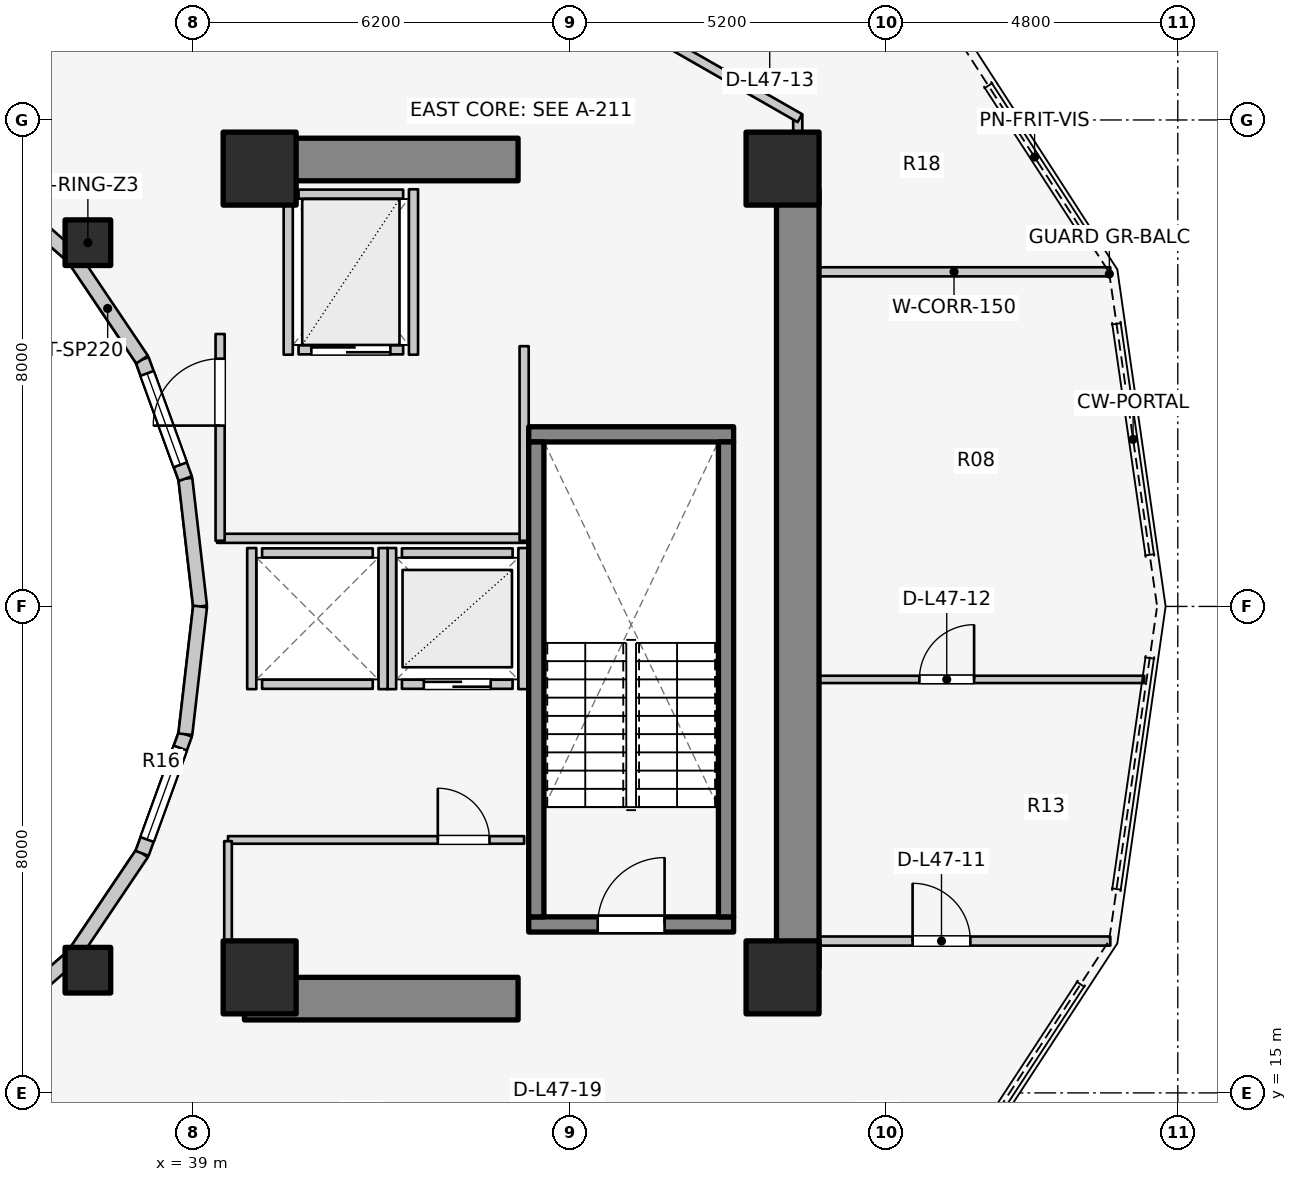
"""IFC4 building model, lengths in metres.
Left out: names, types, materials, properties, quantities, classifications, styles, units other than length and angle.
Written with IfcOpenShell. Run it as: python <this file> out.ifc"""

import sys

from ifc_helpers import new_model, si_unit, direction, frame, frame_2d, origin, origin_2d, place, context, subcontext, project, spatial, rectangle, extrude, element, fill, save


model = new_model("IFC4")
c1 = context("Model", 3, precision=1e-05, world=origin(), true_north=direction((0.0, 1.0)))
c2 = subcontext(c1, "Body", "Model", "MODEL_VIEW")
j1 = project(units=[si_unit("LENGTHUNIT", "METRE"), si_unit("PLANEANGLEUNIT", "RADIAN")], contexts=[c1])
p1 = place(None, origin())
s1 = spatial("IfcSite", under=j1, at=p1, CompositionType="ELEMENT")
p2 = place(p1, origin())
s2 = spatial("IfcBuilding", under=s1, at=p2, CompositionType="ELEMENT")
p3 = place(p2, frame((0.0, 0.0, 156.0)))
s3 = spatial("IfcBuildingStorey", under=s2, at=p3, CompositionType="ELEMENT", Elevation=156.0)
p4 = place(p3, frame((48.95, 17.05, 0.0), z_axis=(0.0, 0.0, 1.0), x_axis=(0.0, 1.0, 0.0)))
e1 = element("IfcWall", 1, at=p4, inside=s3, PredefinedType="SHEAR", context=c2, shape_type="SweptSolid", body=[
    extrude(rectangle(XDim=12.8, YDim=0.7, at=frame_2d((6.4, 0.0))), origin(), (0.0, 0.0, 1.0), 3.1),
])
for number, where, z_axis, x_axis in (
    (2, (39.85, 16.55, 0.0), (0.0, 0.0, 1.0), (1.0, 0.0, 0.0)),
    (3, (39.85, 30.35, 0.0), (0.0, 0.0, 1.0), (1.0, 0.0, 0.0)),
):
    element("IfcWall", number, at=place(p3, frame(where, z_axis=z_axis, x_axis=x_axis)), inside=s3, PredefinedType="SHEAR", context=c2, shape_type="SweptSolid", body=[
        extrude(rectangle(XDim=4.5, YDim=0.7, at=frame_2d((2.25, 0.0))), origin(), (0.0, 0.0, 1.0), 3.1),
    ])
p5 = place(p3, frame((44.525, 17.77, 0.0), z_axis=(0.0, 0.0, 1.0), x_axis=(1.0, 0.0, 0.0)))
e4 = element("IfcWall", 4, at=p5, inside=s3, PredefinedType="SOLIDWALL", context=c2, shape_type="SweptSolid", body=[
    extrude(rectangle(XDim=3.37, YDim=0.25, at=frame_2d((1.685, 0.0))), origin(), (0.0, 0.0, 1.0), 3.1),
])
p6 = place(p5, frame((1.135, 0.0, 0.0)))
e5 = element("IfcOpeningElement", 5, at=p6, cuts=e4, PredefinedType="OPENING", context=c2, shape_type="SweptSolid", body=[
    extrude(rectangle(XDim=1.1, YDim=2.1, at=frame_2d((0.55, 1.05))), frame((0.0, 0.135, 0.0), z_axis=(0.0, -1.0, 0.0), x_axis=(1.0, 0.0, 0.0)), (0.0, 0.0, 1.0), 0.27),
])
p7 = place(p3, frame((44.525, 25.83, 0.0), z_axis=(0.0, 0.0, 1.0), x_axis=(1.0, 0.0, 0.0)))
e6 = element("IfcWall", 6, at=p7, inside=s3, PredefinedType="SOLIDWALL", context=c2, shape_type="SweptSolid", body=[
    extrude(rectangle(XDim=3.37, YDim=0.25, at=frame_2d((1.685, 0.0))), origin(), (0.0, 0.0, 1.0), 3.1),
])
for number, where, z_axis, x_axis in (
    (7, (44.65, 17.895, 0.0), (0.0, 0.0, 1.0), (0.0, 1.0, 0.0)),
    (8, (47.77, 17.895, 0.0), (0.0, 0.0, 1.0), (0.0, 1.0, 0.0)),
):
    element("IfcWall", number, at=place(p3, frame(where, z_axis=z_axis, x_axis=x_axis)), inside=s3, PredefinedType="SOLIDWALL", context=c2, shape_type="SweptSolid", body=[
        extrude(rectangle(XDim=7.81, YDim=0.25, at=frame_2d((3.905, 0.0))), origin(), (0.0, 0.0, 1.0), 3.1),
    ])
for number, where, z_axis, x_axis in (
    (9, (40.1, 16.9, 0.0), (0.0, 0.0, 1.0), (1.0, 0.0, 0.0)),
    (10, (48.7, 16.9, 0.0), (0.0, 0.0, 1.0), (1.0, 0.0, 0.0)),
    (11, (48.7, 30.2, 0.0), (0.0, 0.0, 1.0), (1.0, 0.0, 0.0)),
    (12, (40.1, 30.2, 0.0), (0.0, 0.0, 1.0), (1.0, 0.0, 0.0)),
):
    element("IfcColumn", number, at=place(p3, frame(where, z_axis=z_axis, x_axis=x_axis)), inside=s3, PredefinedType="COLUMN", context=c2, shape_type="SweptSolid", body=[
        extrude(rectangle(XDim=1.2, YDim=1.2, at=origin_2d()), origin(), (0.0, 0.0, 1.0), 3.1),
    ])
for number, where, z_axis, x_axis in (
    (13, (37.275, 28.982, 0.0), (0.0, 0.0, 1.0), (1.0, 0.0, 0.0)),
    (14, (37.275, 17.018, 0.0), (0.0, 0.0, 1.0), (1.0, 0.0, 0.0)),
):
    element("IfcColumn", number, at=place(p3, frame(where, z_axis=z_axis, x_axis=x_axis)), inside=s3, PredefinedType="COLUMN", context=c2, shape_type="SweptSolid", body=[
        extrude(rectangle(XDim=0.75, YDim=0.75, at=origin_2d()), origin(), (0.0, 0.0, 1.0), 3.1),
    ])
p8 = place(p3, frame((39.12, 23.0, 0.0), z_axis=(0.0, 0.0, 1.0), x_axis=(-0.114711713601, 0.993398823617, 0.0)))
e15 = element("IfcWall", 15, at=p8, inside=s3, PredefinedType="STANDARD", context=c2, shape_type="SweptSolid", body=[
    extrude(rectangle(XDim=2.115, YDim=0.23, at=frame_2d((1.058, 0.0))), origin(), (0.0, 0.0, 1.0), 2.84),
])
p9 = place(p3, frame((38.877, 25.102, 0.0), z_axis=(0.0, 0.0, 1.0), x_axis=(-0.341423187295, 0.93990968033, 0.0)))
e16 = element("IfcWall", 16, at=p9, inside=s3, PredefinedType="STANDARD", context=c2, shape_type="SweptSolid", body=[
    extrude(rectangle(XDim=2.084, YDim=0.23, at=frame_2d((1.042, 0.0))), origin(), (0.0, 0.0, 1.0), 2.84),
])
p10 = place(p9, frame((0.242, 0.0, 0.85)))
e17 = element("IfcOpeningElement", 17, at=p10, cuts=e16, PredefinedType="OPENING", context=c2, shape_type="SweptSolid", body=[
    extrude(rectangle(XDim=1.6, YDim=1.65, at=frame_2d((0.8, 0.825))), frame((0.0, 0.125, 0.0), z_axis=(0.0, -1.0, 0.0), x_axis=(1.0, 0.0, 0.0)), (0.0, 0.0, 1.0), 0.25),
])
p11 = place(p3, frame((38.166, 27.06, 0.0), z_axis=(0.0, 0.0, 1.0), x_axis=(-0.558197800898, 0.829707909492, 0.0)))
e18 = element("IfcWall", 18, at=p11, inside=s3, PredefinedType="STANDARD", context=c2, shape_type="SweptSolid", body=[
    extrude(rectangle(XDim=2.027, YDim=0.23, at=frame_2d((1.013, 0.0))), origin(), (0.0, 0.0, 1.0), 2.16),
])
for number, where, z_axis, x_axis in (
    (19, (37.035, 28.742, 0.0), (0.0, 0.0, 1.0), (-0.753, 0.659, 0.0)),
    (20, (35.56, 15.968, 0.0), (0.0, 0.0, 1.0), (0.753, 0.659, 0.0)),
):
    element("IfcWall", number, at=place(p3, frame(where, z_axis=z_axis, x_axis=x_axis)), inside=s3, PredefinedType="STANDARD", context=c2, shape_type="SweptSolid", body=[
        extrude(rectangle(XDim=1.959, YDim=0.23, at=frame_2d((0.98, 0.0))), origin(), (0.0, 0.0, 1.0), 2.16),
    ])
p12 = place(p3, frame((37.035, 17.258, 0.0), z_axis=(0.0, 0.0, 1.0), x_axis=(0.558197800898, 0.829707909492, 0.0)))
e21 = element("IfcWall", 21, at=p12, inside=s3, PredefinedType="STANDARD", context=c2, shape_type="SweptSolid", body=[
    extrude(rectangle(XDim=2.027, YDim=0.23, at=frame_2d((1.013, 0.0))), origin(), (0.0, 0.0, 1.0), 2.16),
])
p13 = place(p3, frame((38.166, 18.94, 0.0), z_axis=(0.0, 0.0, 1.0), x_axis=(0.341423187295, 0.93990968033, 0.0)))
e22 = element("IfcWall", 22, at=p13, inside=s3, PredefinedType="STANDARD", context=c2, shape_type="SweptSolid", body=[
    extrude(rectangle(XDim=2.084, YDim=0.23, at=frame_2d((1.042, 0.0))), origin(), (0.0, 0.0, 1.0), 2.84),
])
p14 = place(p13, frame((0.242, 0.0, 0.85)))
e23 = element("IfcOpeningElement", 23, at=p14, cuts=e22, PredefinedType="OPENING", context=c2, shape_type="SweptSolid", body=[
    extrude(rectangle(XDim=1.6, YDim=1.65, at=frame_2d((0.8, 0.825))), frame((0.0, 0.125, 0.0), z_axis=(0.0, -1.0, 0.0), x_axis=(1.0, 0.0, 0.0)), (0.0, 0.0, 1.0), 0.25),
])
p15 = place(p3, frame((38.877, 20.898, 0.0), z_axis=(0.0, 0.0, 1.0), x_axis=(0.114711713601, 0.993398823617, 0.0)))
e24 = element("IfcWall", 24, at=p15, inside=s3, PredefinedType="STANDARD", context=c2, shape_type="SweptSolid", body=[
    extrude(rectangle(XDim=2.115, YDim=0.23, at=frame_2d((1.058, 0.0))), origin(), (0.0, 0.0, 1.0), 2.84),
])
p16 = place(p3, frame((42.44, 21.72, 0.0), z_axis=(0.0, 0.0, 1.0), x_axis=(1.0, 0.0, 0.0)))
e25 = element("IfcWall", 25, at=p16, inside=s3, PredefinedType="SOLIDWALL", context=c2, shape_type="SweptSolid", body=[
    extrude(rectangle(XDim=1.82, YDim=0.15, at=frame_2d((0.91, 0.0))), origin(), (0.0, 0.0, 1.0), 2.855),
])
p17 = place(p16, frame((0.36, 0.0, 0.0)))
e26 = element("IfcOpeningElement", 26, at=p17, cuts=e25, PredefinedType="OPENING", context=c2, shape_type="SweptSolid", body=[
    extrude(rectangle(XDim=1.1, YDim=2.1, at=frame_2d((0.55, 1.05))), frame((0.0, 0.085, 0.0), z_axis=(0.0, -1.0, 0.0), x_axis=(1.0, 0.0, 0.0)), (0.0, 0.0, 1.0), 0.17),
])
p18 = place(p3, frame((42.44, 23.88, 0.0), z_axis=(0.0, 0.0, 1.0), x_axis=(1.0, 0.0, 0.0)))
e27 = element("IfcWall", 27, at=p18, inside=s3, PredefinedType="SOLIDWALL", context=c2, shape_type="SweptSolid", body=[
    extrude(rectangle(XDim=1.82, YDim=0.15, at=frame_2d((0.91, 0.0))), origin(), (0.0, 0.0, 1.0), 2.855),
])
for number, where, z_axis, x_axis in (
    (28, (42.27, 21.64, 0.0), (0.0, 0.0, 1.0), (0.0, 1.0, 0.0)),
    (29, (44.43, 21.64, 0.0), (0.0, 0.0, 1.0), (0.0, 1.0, 0.0)),
):
    element("IfcWall", number, at=place(p3, frame(where, z_axis=z_axis, x_axis=x_axis)), inside=s3, PredefinedType="SOLIDWALL", context=c2, shape_type="SweptSolid", body=[
        extrude(rectangle(XDim=2.32, YDim=0.15, at=frame_2d((1.16, 0.0))), origin(), (0.0, 0.0, 1.0), 2.855),
    ])
for number, where, z_axis, x_axis in (
    (30, (40.14, 21.72, 0.0), (0.0, 0.0, 1.0), (1.0, 0.0, 0.0)),
    (31, (40.14, 23.88, 0.0), (0.0, 0.0, 1.0), (1.0, 0.0, 0.0)),
):
    element("IfcWall", number, at=place(p3, frame(where, z_axis=z_axis, x_axis=x_axis)), inside=s3, PredefinedType="SOLIDWALL", context=c2, shape_type="SweptSolid", body=[
        extrude(rectangle(XDim=1.82, YDim=0.15, at=frame_2d((0.91, 0.0))), origin(), (0.0, 0.0, 1.0), 2.12),
    ])
p19 = place(p3, frame((39.97, 21.64, 0.0), z_axis=(0.0, 0.0, 1.0), x_axis=(0.0, 1.0, 0.0)))
e32 = element("IfcWall", 32, at=p19, inside=s3, PredefinedType="SOLIDWALL", context=c2, shape_type="SweptSolid", body=[
    extrude(rectangle(XDim=2.32, YDim=0.15, at=frame_2d((1.16, 0.0))), origin(), (0.0, 0.0, 1.0), 2.12),
])
p20 = place(p3, frame((42.13, 21.64, 0.0), z_axis=(0.0, 0.0, 1.0), x_axis=(0.0, 1.0, 0.0)))
e33 = element("IfcWall", 33, at=p20, inside=s3, PredefinedType="SOLIDWALL", context=c2, shape_type="SweptSolid", body=[
    extrude(rectangle(XDim=2.32, YDim=0.15, at=frame_2d((1.16, 0.0))), origin(), (0.0, 0.0, 1.0), 2.855),
])
p21 = place(p3, frame((40.74, 27.22, 0.0), z_axis=(0.0, 0.0, 1.0), x_axis=(1.0, 0.0, 0.0)))
e34 = element("IfcWall", 34, at=p21, inside=s3, PredefinedType="SOLIDWALL", context=c2, shape_type="SweptSolid", body=[
    extrude(rectangle(XDim=1.72, YDim=0.15, at=frame_2d((0.86, 0.0))), origin(), (0.0, 0.0, 1.0), 2.855),
])
p22 = place(p21, frame((0.21, 0.0, 0.0)))
e35 = element("IfcOpeningElement", 35, at=p22, cuts=e34, PredefinedType="OPENING", context=c2, shape_type="SweptSolid", body=[
    extrude(rectangle(XDim=1.3, YDim=2.1, at=frame_2d((0.65, 1.05))), frame((0.0, 0.085, 0.0), z_axis=(0.0, -1.0, 0.0), x_axis=(1.0, 0.0, 0.0)), (0.0, 0.0, 1.0), 0.17),
])
p23 = place(p3, frame((40.74, 29.78, 0.0), z_axis=(0.0, 0.0, 1.0), x_axis=(1.0, 0.0, 0.0)))
e36 = element("IfcWall", 36, at=p23, inside=s3, PredefinedType="SOLIDWALL", context=c2, shape_type="SweptSolid", body=[
    extrude(rectangle(XDim=1.72, YDim=0.15, at=frame_2d((0.86, 0.0))), origin(), (0.0, 0.0, 1.0), 2.855),
])
for number, where, z_axis, x_axis in (
    (37, (40.57, 27.14, 0.0), (0.0, 0.0, 1.0), (0.0, 1.0, 0.0)),
    (38, (42.63, 27.14, 0.0), (0.0, 0.0, 1.0), (0.0, 1.0, 0.0)),
):
    element("IfcWall", number, at=place(p3, frame(where, z_axis=z_axis, x_axis=x_axis)), inside=s3, PredefinedType="SOLIDWALL", context=c2, shape_type="SweptSolid", body=[
        extrude(rectangle(XDim=2.72, YDim=0.15, at=frame_2d((1.36, 0.0))), origin(), (0.0, 0.0, 1.0), 2.855),
    ])
p24 = place(p3, frame((39.4, 24.12, 0.0), z_axis=(0.0, 0.0, 1.0), x_axis=(1.0, 0.0, 0.0)))
e39 = element("IfcWall", 39, at=p24, inside=s3, PredefinedType="PARTITIONING", context=c2, shape_type="SweptSolid", body=[
    extrude(rectangle(XDim=5.08, YDim=0.15, at=frame_2d((2.54, 0.0))), origin(), (0.0, 0.0, 1.0), 2.12),
])
p25 = place(p3, frame((44.45, 24.08, 0.0), z_axis=(0.0, 0.0, 1.0), x_axis=(0.0, 1.0, 0.0)))
e40 = element("IfcWall", 40, at=p25, inside=s3, PredefinedType="PARTITIONING", context=c2, shape_type="SweptSolid", body=[
    extrude(rectangle(XDim=3.2, YDim=0.15, at=frame_2d((1.6, 0.0))), origin(), (0.0, 0.0, 1.0), 2.855),
])
p26 = place(p3, frame((39.45, 24.08, 0.0), z_axis=(0.0, 0.0, 1.0), x_axis=(0.0, 1.0, 0.0)))
e41 = element("IfcWall", 41, at=p26, inside=s3, PredefinedType="PARTITIONING", context=c2, shape_type="SweptSolid", body=[
    extrude(rectangle(XDim=3.4, YDim=0.15, at=frame_2d((1.7, 0.0))), origin(), (0.0, 0.0, 1.0), 2.855),
])
p27 = place(p26, frame((1.894, 0.0, 0.0)))
e42 = element("IfcOpeningElement", 42, at=p27, cuts=e41, PredefinedType="OPENING", context=c2, shape_type="SweptSolid", body=[
    extrude(rectangle(XDim=1.1, YDim=2.1, at=frame_2d((0.55, 1.05))), frame((0.0, 0.085, 0.0), z_axis=(0.0, -1.0, 0.0), x_axis=(1.0, 0.0, 0.0)), (0.0, 0.0, 1.0), 0.17),
])
p28 = place(p3, frame((39.58, 19.16, 0.0), z_axis=(0.0, 0.0, 1.0), x_axis=(1.0, 0.0, 0.0)))
e43 = element("IfcWall", 43, at=p28, inside=s3, PredefinedType="PARTITIONING", context=c2, shape_type="SweptSolid", body=[
    extrude(rectangle(XDim=4.87, YDim=0.125, at=frame_2d((2.435, 0.0))), origin(), (0.0, 0.0, 1.0), 2.12),
])
p29 = place(p28, frame((3.45, 0.0, 0.0)))
e44 = element("IfcOpeningElement", 44, at=p29, cuts=e43, PredefinedType="OPENING", context=c2, shape_type="SweptSolid", body=[
    extrude(rectangle(XDim=0.85, YDim=2.05, at=frame_2d((0.425, 1.025))), frame((0.0, 0.073, 0.0), z_axis=(0.0, -1.0, 0.0), x_axis=(1.0, 0.0, 0.0)), (0.0, 0.0, 1.0), 0.145),
])
p30 = place(p3, frame((39.58, 17.1, 0.0), z_axis=(0.0, 0.0, 1.0), x_axis=(0.0, 1.0, 0.0)))
e45 = element("IfcWall", 45, at=p30, inside=s3, PredefinedType="PARTITIONING", context=c2, shape_type="SweptSolid", body=[
    extrude(rectangle(XDim=2.04, YDim=0.125, at=frame_2d((1.02, 0.0))), origin(), (0.0, 0.0, 1.0), 2.232),
])
p31 = place(p3, frame((48.95, 17.497, 0.0), z_axis=(0.0, 0.0, 1.0), x_axis=(1.0, 0.0, 0.0)))
e46 = element("IfcWall", 46, at=p31, inside=s3, PredefinedType="PARTITIONING", context=c2, shape_type="SweptSolid", body=[
    extrude(rectangle(XDim=5.14, YDim=0.15, at=frame_2d((2.57, 0.0))), origin(), (0.0, 0.0, 1.0), 2.855),
])
p32 = place(p31, frame((1.889, 0.0, 0.0)))
e47 = element("IfcOpeningElement", 47, at=p32, cuts=e46, PredefinedType="OPENING", context=c2, shape_type="SweptSolid", body=[
    extrude(rectangle(XDim=0.95, YDim=2.1, at=frame_2d((0.475, 1.05))), frame((0.0, 0.085, 0.0), z_axis=(0.0, -1.0, 0.0), x_axis=(1.0, 0.0, 0.0)), (0.0, 0.0, 1.0), 0.17),
])
p33 = place(p3, frame((48.95, 28.503, 0.0), z_axis=(0.0, 0.0, 1.0), x_axis=(1.0, 0.0, 0.0)))
e48 = element("IfcWall", 48, at=p33, inside=s3, PredefinedType="PARTITIONING", context=c2, shape_type="SweptSolid", body=[
    extrude(rectangle(XDim=5.14, YDim=0.15, at=frame_2d((2.57, 0.0))), origin(), (0.0, 0.0, 1.0), 2.855),
])
p34 = place(p3, frame((48.95, 21.8, 0.0), z_axis=(0.0, 0.0, 1.0), x_axis=(1.0, 0.0, 0.0)))
e49 = element("IfcWall", 49, at=p34, inside=s3, PredefinedType="MOVABLE", context=c2, shape_type="SweptSolid", body=[
    extrude(rectangle(XDim=5.698, YDim=0.12, at=frame_2d((2.849, 0.0))), origin(), (0.0, 0.0, 1.0), 2.855),
])
p35 = place(p34, frame((2.0, 0.0, 0.0)))
e50 = element("IfcOpeningElement", 50, at=p35, cuts=e49, PredefinedType="OPENING", context=c2, shape_type="SweptSolid", body=[
    extrude(rectangle(XDim=0.9, YDim=2.1, at=frame_2d((0.45, 1.05))), frame((0.0, 0.07, 0.0), z_axis=(0.0, -1.0, 0.0), x_axis=(1.0, 0.0, 0.0)), (0.0, 0.0, 1.0), 0.14),
])
p36 = place(p3, frame((48.95, 29.8, 0.0), z_axis=(0.0, 0.0, 1.0), x_axis=(0.0, 1.0, 0.0)))
e51 = element("IfcWall", 51, at=p36, inside=s3, PredefinedType="PARTITIONING", context=c2, shape_type="SweptSolid", body=[
    extrude(rectangle(XDim=1.29, YDim=0.15, at=frame_2d((0.645, 0.0))), origin(), (0.0, 0.0, 1.0), 2.855),
])
p37 = place(p3, frame((46.757, 32.305, 0.0), z_axis=(0.0, 0.0, 1.0), x_axis=(0.867991349648, -0.496579315857, 0.0)))
e52 = element("IfcWall", 52, at=p37, inside=s3, PredefinedType="PARTITIONING", context=c2, shape_type="SweptSolid", body=[
    extrude(rectangle(XDim=2.567, YDim=0.15, at=frame_2d((1.283, 0.0))), origin(), (0.0, 0.0, 1.0), 2.22),
])
p38 = place(p3, frame((35.55, 15.985, 0.0), z_axis=(0.0, 0.0, 1.0), x_axis=(0.523587550846, -0.851971875474, 0.0)))
e53 = element("IfcWall", 53, at=p38, inside=s3, PredefinedType="PARTITIONING", context=c2, shape_type="SweptSolid", body=[
    extrude(rectangle(XDim=3.153, YDim=0.125, at=frame_2d((1.577, 0.0))), origin(), (0.0, 0.0, 1.0), 2.299),
])
p39 = place(p10, origin())
e54 = element("IfcWindow", 54, at=p39, inside=s3, PartitioningType="SINGLE_PANEL", PredefinedType="WINDOW", context=c2, shape_type="SweptSolid", body=[
    extrude(rectangle(XDim=1.6, YDim=1.65, at=frame_2d((0.8, 0.825))), frame((0.0, 0.03, 0.0), z_axis=(0.0, -1.0, 0.0), x_axis=(1.0, 0.0, 0.0)), (0.0, 0.0, 1.0), 0.06),
])
fill(e17, e54)
p40 = place(p14, origin())
e55 = element("IfcWindow", 55, at=p40, inside=s3, PartitioningType="SINGLE_PANEL", PredefinedType="WINDOW", context=c2, shape_type="SweptSolid", body=[
    extrude(rectangle(XDim=1.6, YDim=1.65, at=frame_2d((0.8, 0.825))), frame((0.0, 0.03, 0.0), z_axis=(0.0, -1.0, 0.0), x_axis=(1.0, 0.0, 0.0)), (0.0, 0.0, 1.0), 0.06),
])
fill(e23, e55)
p41 = place(p6, origin())
e56 = element("IfcDoor", 56, at=p41, inside=s3, OperationType="SINGLE_SWING_RIGHT", PredefinedType="DOOR", context=c2, shape_type="SweptSolid", body=[
    extrude(rectangle(XDim=1.1, YDim=2.1, at=frame_2d((0.55, 1.05))), frame((0.0, 0.025, 0.0), z_axis=(0.0, -1.0, 0.0), x_axis=(1.0, 0.0, 0.0)), (0.0, 0.0, 1.0), 0.05),
])
fill(e5, e56)
p42 = place(p17, origin())
e57 = element("IfcDoor", 57, at=p42, inside=s3, OperationType="DOUBLE_DOOR_SLIDING", PredefinedType="DOOR", context=c2, shape_type="SweptSolid", body=[
    extrude(rectangle(XDim=1.1, YDim=2.1, at=frame_2d((0.55, 1.05))), frame((0.0, 0.025, 0.0), z_axis=(0.0, -1.0, 0.0), x_axis=(1.0, 0.0, 0.0)), (0.0, 0.0, 1.0), 0.05),
])
fill(e26, e57)
p43 = place(p22, origin())
e58 = element("IfcDoor", 58, at=p43, inside=s3, OperationType="DOUBLE_DOOR_SLIDING", PredefinedType="DOOR", context=c2, shape_type="SweptSolid", body=[
    extrude(rectangle(XDim=1.3, YDim=2.1, at=frame_2d((0.65, 1.05))), frame((0.0, 0.025, 0.0), z_axis=(0.0, -1.0, 0.0), x_axis=(1.0, 0.0, 0.0)), (0.0, 0.0, 1.0), 0.05),
])
fill(e35, e58)
p44 = place(p27, origin())
e59 = element("IfcDoor", 59, at=p44, inside=s3, OperationType="SINGLE_SWING_LEFT", PredefinedType="DOOR", context=c2, shape_type="SweptSolid", body=[
    extrude(rectangle(XDim=1.1, YDim=2.1, at=frame_2d((0.55, 1.05))), frame((0.0, 0.025, 0.0), z_axis=(0.0, -1.0, 0.0), x_axis=(1.0, 0.0, 0.0)), (0.0, 0.0, 1.0), 0.05),
])
fill(e42, e59)
p45 = place(p29, origin())
e60 = element("IfcDoor", 60, at=p45, inside=s3, OperationType="SINGLE_SWING_LEFT", PredefinedType="DOOR", context=c2, shape_type="SweptSolid", body=[
    extrude(rectangle(XDim=0.85, YDim=2.05, at=frame_2d((0.425, 1.025))), frame((0.0, 0.025, 0.0), z_axis=(0.0, -1.0, 0.0), x_axis=(1.0, 0.0, 0.0)), (0.0, 0.0, 1.0), 0.05),
])
fill(e44, e60)
p46 = place(p32, origin())
e61 = element("IfcDoor", 61, at=p46, inside=s3, OperationType="SINGLE_SWING_LEFT", PredefinedType="DOOR", context=c2, shape_type="SweptSolid", body=[
    extrude(rectangle(XDim=0.95, YDim=2.1, at=frame_2d((0.475, 1.05))), frame((0.0, 0.025, 0.0), z_axis=(0.0, -1.0, 0.0), x_axis=(1.0, 0.0, 0.0)), (0.0, 0.0, 1.0), 0.05),
])
fill(e47, e61)
p47 = place(p35, origin())
e62 = element("IfcDoor", 62, at=p47, inside=s3, OperationType="SINGLE_SWING_RIGHT", PredefinedType="DOOR", context=c2, shape_type="SweptSolid", body=[
    extrude(rectangle(XDim=0.9, YDim=2.1, at=frame_2d((0.45, 1.05))), frame((0.0, 0.025, 0.0), z_axis=(0.0, -1.0, 0.0), x_axis=(1.0, 0.0, 0.0)), (0.0, 0.0, 1.0), 0.05),
])
fill(e50, e62)
save(model, sys.argv[1])
